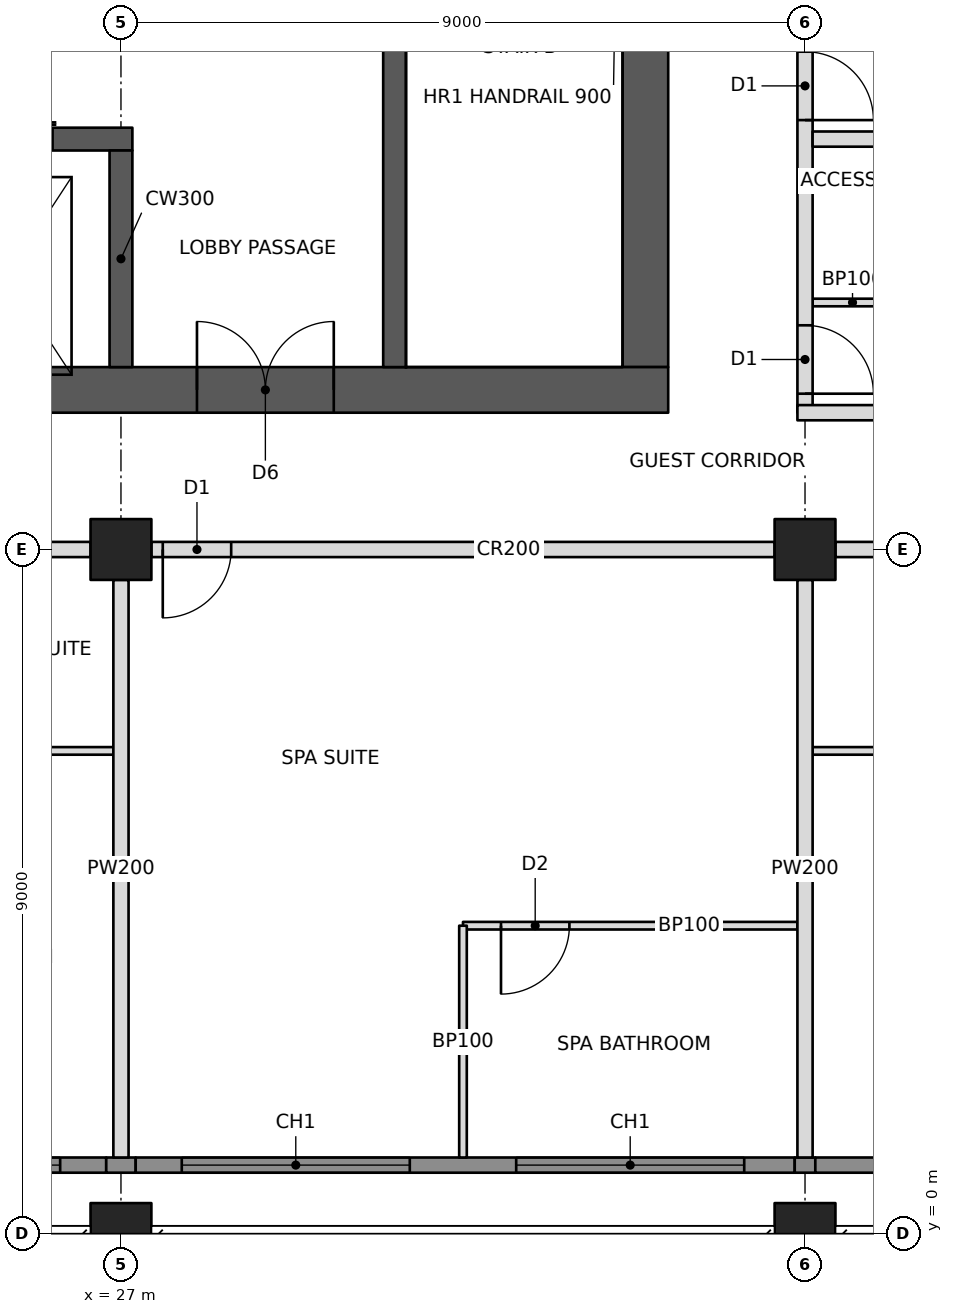
"""IFC4 building model, lengths in metres.
Left out: names, types, materials, properties, quantities, classifications, styles, units other than length and angle.
Written with IfcOpenShell. Run it as: python <this file> out.ifc"""

import sys

from ifc_helpers import new_model, si_unit, direction, frame, frame_2d, origin, origin_2d, place, context, subcontext, project, spatial, rectangle, hollow_rectangle, extrude, element, fill, save


model = new_model("IFC4")
c1 = context("Model", 3, precision=1e-05, world=origin(), true_north=direction((0.0, 1.0)))
c2 = subcontext(c1, "Body", "Model", "MODEL_VIEW")
j1 = project(units=[si_unit("LENGTHUNIT", "METRE"), si_unit("PLANEANGLEUNIT", "RADIAN")], contexts=[c1])
p1 = place(None, origin())
s1 = spatial("IfcSite", under=j1, at=p1, CompositionType="ELEMENT")
p2 = place(p1, origin())
s2 = spatial("IfcBuilding", under=s1, at=p2, CompositionType="ELEMENT")
p3 = place(p2, frame((0.0, 0.0, 201.2)))
s3 = spatial("IfcBuildingStorey", under=s2, at=p3, CompositionType="ELEMENT", Elevation=201.2)
p4 = place(p3, frame((27.0, 0.0, 0.0), z_axis=(0.0, 0.0, 1.0), x_axis=(1.0, 0.0, 0.0)))
e1 = element("IfcColumn", 1, at=p4, inside=s3, PredefinedType="COLUMN", context=c2, shape_type="SweptSolid", body=[
    extrude(hollow_rectangle(XDim=0.8, YDim=0.8, WallThickness=0.06, at=origin_2d()), origin(), (0.0, 0.0, 1.0), 3.4),
])
p5 = place(p3, frame((27.0, 9.0, 0.0), z_axis=(0.0, 0.0, 1.0), x_axis=(1.0, 0.0, 0.0)))
e2 = element("IfcColumn", 2, at=p5, inside=s3, PredefinedType="COLUMN", context=c2, shape_type="SweptSolid", body=[
    extrude(hollow_rectangle(XDim=0.8, YDim=0.8, WallThickness=0.05, at=origin_2d()), origin(), (0.0, 0.0, 1.0), 3.4),
])
p6 = place(p3, frame((36.0, 0.0, 0.0), z_axis=(0.0, 0.0, 1.0), x_axis=(1.0, 0.0, 0.0)))
e3 = element("IfcColumn", 3, at=p6, inside=s3, PredefinedType="COLUMN", context=c2, shape_type="SweptSolid", body=[
    extrude(hollow_rectangle(XDim=0.8, YDim=0.8, WallThickness=0.06, at=origin_2d()), origin(), (0.0, 0.0, 1.0), 3.4),
])
p7 = place(p3, frame((36.0, 9.0, 0.0), z_axis=(0.0, 0.0, 1.0), x_axis=(0.0, 1.0, 0.0)))
e4 = element("IfcColumn", 4, at=p7, inside=s3, PredefinedType="COLUMN", context=c2, shape_type="SweptSolid", body=[
    extrude(hollow_rectangle(XDim=0.8, YDim=0.8, WallThickness=0.05, at=origin_2d()), origin(), (0.0, 0.0, 1.0), 3.4),
])
p8 = place(p3, frame((10.8, 11.1, 0.0), z_axis=(0.0, 0.0, 1.0), x_axis=(1.0, 0.0, 0.0)))
e5 = element("IfcWall", 5, at=p8, inside=s3, PredefinedType="SHEAR", context=c2, shape_type="SweptSolid", body=[
    extrude(rectangle(XDim=23.4, YDim=0.6, at=frame_2d((11.7, 0.0))), origin(), (0.0, 0.0, 1.0), 3.4),
])
p9 = place(p8, frame((1.0, 0.0, 0.0)))
e6 = element("IfcOpeningElement", 6, at=p9, cuts=e5, PredefinedType="OPENING", context=c2, shape_type="SweptSolid", body=[
    extrude(rectangle(XDim=1.0, YDim=2.1, at=frame_2d((0.5, 1.05))), frame((0.0, 0.31, 0.0), z_axis=(0.0, -1.0, 0.0), x_axis=(1.0, 0.0, 0.0)), (0.0, 0.0, 1.0), 0.62),
])
p10 = place(p8, frame((17.2, 0.0, 0.0)))
e7 = element("IfcOpeningElement", 7, at=p10, cuts=e5, PredefinedType="OPENING", context=c2, shape_type="SweptSolid", body=[
    extrude(rectangle(XDim=1.8, YDim=2.1, at=frame_2d((0.9, 1.05))), frame((0.0, 0.31, 0.0), z_axis=(0.0, -1.0, 0.0), x_axis=(1.0, 0.0, 0.0)), (0.0, 0.0, 1.0), 0.62),
])
p11 = place(p3, frame((33.9, 11.4, 0.0), z_axis=(0.0, 0.0, 1.0), x_axis=(0.0, 1.0, 0.0)))
e8 = element("IfcWall", 8, at=p11, inside=s3, PredefinedType="SHEAR", context=c2, shape_type="SweptSolid", body=[
    extrude(rectangle(XDim=13.2, YDim=0.6, at=frame_2d((6.6, 0.0))), origin(), (0.0, 0.0, 1.0), 3.4),
])
p12 = place(p3, frame((18.15, 14.4, 0.0), z_axis=(0.0, 0.0, 1.0), x_axis=(1.0, 0.0, 0.0)))
e9 = element("IfcWall", 9, at=p12, inside=s3, PredefinedType="SHEAR", context=c2, shape_type="SweptSolid", body=[
    extrude(rectangle(XDim=9.0, YDim=0.3, at=frame_2d((4.5, 0.0))), origin(), (0.0, 0.0, 1.0), 3.4),
])
p13 = place(p12, frame((0.8, 0.0, 0.0)))
e10 = element("IfcOpeningElement", 10, at=p13, cuts=e9, PredefinedType="OPENING", context=c2, shape_type="SweptSolid", body=[
    extrude(rectangle(XDim=1.1, YDim=2.1, at=frame_2d((0.55, 1.05))), frame((0.0, 0.16, 0.0), z_axis=(0.0, -1.0, 0.0), x_axis=(1.0, 0.0, 0.0)), (0.0, 0.0, 1.0), 0.32),
])
p14 = place(p12, frame((6.75, 0.0, 0.0)))
e11 = element("IfcOpeningElement", 11, at=p14, cuts=e9, PredefinedType="OPENING", context=c2, shape_type="SweptSolid", body=[
    extrude(rectangle(XDim=1.2, YDim=2.1, at=frame_2d((0.6, 1.05))), frame((0.0, 0.16, 0.0), z_axis=(0.0, -1.0, 0.0), x_axis=(1.0, 0.0, 0.0)), (0.0, 0.0, 1.0), 0.32),
])
p15 = place(p12, frame((3.8, 0.0, 0.0)))
e12 = element("IfcOpeningElement", 12, at=p15, cuts=e9, PredefinedType="OPENING", context=c2, shape_type="SweptSolid", body=[
    extrude(rectangle(XDim=1.1, YDim=2.1, at=frame_2d((0.55, 1.05))), frame((0.0, 0.16, 0.0), z_axis=(0.0, -1.0, 0.0), x_axis=(1.0, 0.0, 0.0)), (0.0, 0.0, 1.0), 0.32),
])
p16 = place(p3, frame((27.0, 11.4, 0.0), z_axis=(0.0, 0.0, 1.0), x_axis=(0.0, 1.0, 0.0)))
e13 = element("IfcWall", 13, at=p16, inside=s3, PredefinedType="SHEAR", context=c2, shape_type="SweptSolid", body=[
    extrude(rectangle(XDim=2.85, YDim=0.3, at=frame_2d((1.425, 0.0))), origin(), (0.0, 0.0, 1.0), 3.4),
])
p17 = place(p3, frame((30.6, 11.4, 0.0), z_axis=(0.0, 0.0, 1.0), x_axis=(0.0, 1.0, 0.0)))
e14 = element("IfcWall", 14, at=p17, inside=s3, PredefinedType="SHEAR", context=c2, shape_type="SweptSolid", body=[
    extrude(rectangle(XDim=13.2, YDim=0.3, at=frame_2d((6.6, 0.0))), origin(), (0.0, 0.0, 1.0), 3.4),
])
p18 = place(p3, frame((18.4, 9.0, 0.0), z_axis=(0.0, 0.0, 1.0), x_axis=(1.0, 0.0, 0.0)))
e15 = element("IfcWall", 15, at=p18, inside=s3, PredefinedType="PARTITIONING", context=c2, shape_type="SweptSolid", body=[
    extrude(rectangle(XDim=8.2, YDim=0.2, at=frame_2d((4.1, 0.0))), origin(), (0.0, 0.0, 1.0), 2.405),
])
p19 = place(p18, frame((4.35, 0.0, 0.0)))
e16 = element("IfcOpeningElement", 16, at=p19, cuts=e15, PredefinedType="OPENING", context=c2, shape_type="SweptSolid", body=[
    extrude(rectangle(XDim=0.9, YDim=2.1, at=frame_2d((0.45, 1.05))), frame((0.0, 0.11, 0.0), z_axis=(0.0, -1.0, 0.0), x_axis=(1.0, 0.0, 0.0)), (0.0, 0.0, 1.0), 0.22),
])
p20 = place(p3, frame((27.4, 9.0, 0.0), z_axis=(0.0, 0.0, 1.0), x_axis=(1.0, 0.0, 0.0)))
e17 = element("IfcWall", 17, at=p20, inside=s3, PredefinedType="PARTITIONING", context=c2, shape_type="SweptSolid", body=[
    extrude(rectangle(XDim=8.2, YDim=0.2, at=frame_2d((4.1, 0.0))), origin(), (0.0, 0.0, 1.0), 2.405),
])
p21 = place(p20, frame((0.15, 0.0, 0.0)))
e18 = element("IfcOpeningElement", 18, at=p21, cuts=e17, PredefinedType="OPENING", context=c2, shape_type="SweptSolid", body=[
    extrude(rectangle(XDim=0.9, YDim=2.1, at=frame_2d((0.45, 1.05))), frame((0.0, 0.11, 0.0), z_axis=(0.0, -1.0, 0.0), x_axis=(1.0, 0.0, 0.0)), (0.0, 0.0, 1.0), 0.22),
])
p22 = place(p3, frame((36.4, 9.0, 0.0), z_axis=(0.0, 0.0, 1.0), x_axis=(1.0, 0.0, 0.0)))
e19 = element("IfcWall", 19, at=p22, inside=s3, PredefinedType="PARTITIONING", context=c2, shape_type="SweptSolid", body=[
    extrude(rectangle(XDim=7.6, YDim=0.2, at=frame_2d((3.8, 0.0))), origin(), (0.0, 0.0, 1.0), 2.438),
])
p23 = place(p22, frame((6.45, 0.0, 0.0)))
e20 = element("IfcOpeningElement", 20, at=p23, cuts=e19, PredefinedType="OPENING", context=c2, shape_type="SweptSolid", body=[
    extrude(rectangle(XDim=0.9, YDim=2.1, at=frame_2d((0.45, 1.05))), frame((0.0, 0.11, 0.0), z_axis=(0.0, -1.0, 0.0), x_axis=(1.0, 0.0, 0.0)), (0.0, 0.0, 1.0), 0.22),
])
p24 = place(p3, frame((36.0, 10.8, 0.0), z_axis=(0.0, 0.0, 1.0), x_axis=(0.0, 1.0, 0.0)))
e21 = element("IfcWall", 21, at=p24, inside=s3, PredefinedType="PARTITIONING", context=c2, shape_type="SweptSolid", body=[
    extrude(rectangle(XDim=6.8, YDim=0.2, at=frame_2d((3.4, 0.0))), origin(), (0.0, 0.0, 1.0), 2.405),
])
p25 = place(p24, frame((0.25, 0.0, 0.0)))
e22 = element("IfcOpeningElement", 22, at=p25, cuts=e21, PredefinedType="OPENING", context=c2, shape_type="SweptSolid", body=[
    extrude(rectangle(XDim=0.9, YDim=2.1, at=frame_2d((0.45, 1.05))), frame((0.0, 0.11, 0.0), z_axis=(0.0, -1.0, 0.0), x_axis=(1.0, 0.0, 0.0)), (0.0, 0.0, 1.0), 0.22),
])
p26 = place(p24, frame((3.85, 0.0, 0.0)))
e23 = element("IfcOpeningElement", 23, at=p26, cuts=e21, PredefinedType="OPENING", context=c2, shape_type="SweptSolid", body=[
    extrude(rectangle(XDim=0.9, YDim=2.1, at=frame_2d((0.45, 1.05))), frame((0.0, 0.11, 0.0), z_axis=(0.0, -1.0, 0.0), x_axis=(1.0, 0.0, 0.0)), (0.0, 0.0, 1.0), 0.22),
])
p27 = place(p3, frame((35.9, 10.8, 0.0), z_axis=(0.0, 0.0, 1.0), x_axis=(1.0, 0.0, 0.0)))
e24 = element("IfcWall", 24, at=p27, inside=s3, PredefinedType="PARTITIONING", context=c2, shape_type="SweptSolid", body=[
    extrude(rectangle(XDim=8.1, YDim=0.2, at=frame_2d((4.05, 0.0))), origin(), (0.0, 0.0, 1.0), 2.404),
])
p28 = place(p3, frame((27.0, 8.6, 0.0), z_axis=(0.0, 0.0, 1.0), x_axis=(0.0, -1.0, 0.0)))
e25 = element("IfcWall", 25, at=p28, inside=s3, PredefinedType="PARTITIONING", context=c2, shape_type="SweptSolid", body=[
    extrude(rectangle(XDim=7.6, YDim=0.2, at=frame_2d((3.8, 0.0))), origin(), (0.0, 0.0, 1.0), 2.405),
])
p29 = place(p3, frame((36.0, 8.6, 0.0), z_axis=(0.0, 0.0, 1.0), x_axis=(0.0, -1.0, 0.0)))
e26 = element("IfcWall", 26, at=p29, inside=s3, PredefinedType="PARTITIONING", context=c2, shape_type="SweptSolid", body=[
    extrude(rectangle(XDim=7.6, YDim=0.2, at=frame_2d((3.8, 0.0))), origin(), (0.0, 0.0, 1.0), 2.438),
])
p30 = place(p3, frame((23.95, 6.35, 0.0), z_axis=(0.0, 0.0, 1.0), x_axis=(1.0, 0.0, 0.0)))
e27 = element("IfcWall", 27, at=p30, inside=s3, PredefinedType="PARTITIONING", context=c2, shape_type="SweptSolid", body=[
    extrude(rectangle(XDim=2.95, YDim=0.1, at=frame_2d((1.475, 0.0))), origin(), (0.0, 0.0, 1.0), 2.404),
])
p31 = place(p3, frame((31.5, 4.05, 0.0), z_axis=(0.0, 0.0, 1.0), x_axis=(1.0, 0.0, 0.0)))
e28 = element("IfcWall", 28, at=p31, inside=s3, PredefinedType="PARTITIONING", context=c2, shape_type="SweptSolid", body=[
    extrude(rectangle(XDim=4.4, YDim=0.1, at=frame_2d((2.2, 0.0))), origin(), (0.0, 0.0, 1.0), 2.438),
])
p32 = place(p31, frame((0.5, 0.0, 0.0)))
e29 = element("IfcOpeningElement", 29, at=p32, cuts=e28, PredefinedType="OPENING", context=c2, shape_type="SweptSolid", body=[
    extrude(rectangle(XDim=0.9, YDim=2.1, at=frame_2d((0.45, 1.05))), frame((0.0, 0.06, 0.0), z_axis=(0.0, -1.0, 0.0), x_axis=(1.0, 0.0, 0.0)), (0.0, 0.0, 1.0), 0.12),
])
p33 = place(p3, frame((31.5, 4.05, 0.0), z_axis=(0.0, 0.0, 1.0), x_axis=(0.0, -1.0, 0.0)))
e30 = element("IfcWall", 30, at=p33, inside=s3, PredefinedType="PARTITIONING", context=c2, shape_type="SweptSolid", body=[
    extrude(rectangle(XDim=3.05, YDim=0.1, at=frame_2d((1.525, 0.0))), origin(), (0.0, 0.0, 1.0), 3.2),
])
p34 = place(p3, frame((36.1, 6.35, 0.0), z_axis=(0.0, 0.0, 1.0), x_axis=(1.0, 0.0, 0.0)))
e31 = element("IfcWall", 31, at=p34, inside=s3, PredefinedType="PARTITIONING", context=c2, shape_type="SweptSolid", body=[
    extrude(rectangle(XDim=3.45, YDim=0.1, at=frame_2d((1.725, 0.0))), origin(), (0.0, 0.0, 1.0), 2.438),
])
p35 = place(p3, frame((36.1, 14.4, 0.0), z_axis=(0.0, 0.0, 1.0), x_axis=(1.0, 0.0, 0.0)))
e32 = element("IfcWall", 32, at=p35, inside=s3, PredefinedType="PARTITIONING", context=c2, shape_type="SweptSolid", body=[
    extrude(rectangle(XDim=7.9, YDim=0.2, at=frame_2d((3.95, 0.0))), origin(), (0.0, 0.0, 1.0), 2.404),
])
p36 = place(p3, frame((36.1, 12.25, 0.0), z_axis=(0.0, 0.0, 1.0), x_axis=(1.0, 0.0, 0.0)))
e33 = element("IfcWall", 33, at=p36, inside=s3, PredefinedType="PARTITIONING", context=c2, shape_type="SweptSolid", body=[
    extrude(rectangle(XDim=2.5, YDim=0.1, at=frame_2d((1.25, 0.0))), origin(), (0.0, 0.0, 1.0), 2.404),
])
p37 = place(p36, frame((1.2, 0.0, 0.0)))
e34 = element("IfcOpeningElement", 34, at=p37, cuts=e33, PredefinedType="OPENING", context=c2, shape_type="SweptSolid", body=[
    extrude(rectangle(XDim=0.9, YDim=2.1, at=frame_2d((0.45, 1.05))), frame((0.0, 0.06, 0.0), z_axis=(0.0, -1.0, 0.0), x_axis=(1.0, 0.0, 0.0)), (0.0, 0.0, 1.0), 0.12),
])
p38 = place(p3, frame((18.194, 0.9, 0.0), z_axis=(0.0, 0.0, 1.0), x_axis=(1.0, 0.0, 0.0)))
e35 = element("IfcWall", 35, at=p38, inside=s3, PredefinedType="SOLIDWALL", context=c2, shape_type="SweptSolid", body=[
    extrude(rectangle(XDim=8.612, YDim=0.2, at=frame_2d((4.306, 0.0))), origin(), (0.0, 0.0, 1.0), 3.2),
])
p39 = place(p38, frame((0.606, 0.0, 0.6)))
e36 = element("IfcOpeningElement", 36, at=p39, cuts=e35, PredefinedType="OPENING", context=c2, shape_type="SweptSolid", body=[
    extrude(rectangle(XDim=3.0, YDim=2.2, at=frame_2d((1.5, 1.1))), frame((0.0, 0.11, 0.0), z_axis=(0.0, -1.0, 0.0), x_axis=(1.0, 0.0, 0.0)), (0.0, 0.0, 1.0), 0.22),
])
p40 = place(p38, frame((5.006, 0.0, 0.6)))
e37 = element("IfcOpeningElement", 37, at=p40, cuts=e35, PredefinedType="OPENING", context=c2, shape_type="SweptSolid", body=[
    extrude(rectangle(XDim=3.0, YDim=2.2, at=frame_2d((1.5, 1.1))), frame((0.0, 0.11, 0.0), z_axis=(0.0, -1.0, 0.0), x_axis=(1.0, 0.0, 0.0)), (0.0, 0.0, 1.0), 0.22),
])
p41 = place(p3, frame((26.806, 0.9, 0.0), z_axis=(0.0, 0.0, 1.0), x_axis=(1.0, 0.0, 0.0)))
e38 = element("IfcWall", 38, at=p41, inside=s3, PredefinedType="SOLIDWALL", context=c2, shape_type="SweptSolid", body=[
    extrude(rectangle(XDim=0.388, YDim=0.2, at=frame_2d((0.194, 0.0))), origin(), (0.0, 0.0, 1.0), 2.404),
])
p42 = place(p3, frame((27.194, 0.9, 0.0), z_axis=(0.0, 0.0, 1.0), x_axis=(1.0, 0.0, 0.0)))
e39 = element("IfcWall", 39, at=p42, inside=s3, PredefinedType="SOLIDWALL", context=c2, shape_type="SweptSolid", body=[
    extrude(rectangle(XDim=8.671, YDim=0.2, at=frame_2d((4.335, 0.0))), origin(), (0.0, 0.0, 1.0), 3.2),
])
p43 = place(p42, frame((0.606, 0.0, 0.6)))
e40 = element("IfcOpeningElement", 40, at=p43, cuts=e39, PredefinedType="OPENING", context=c2, shape_type="SweptSolid", body=[
    extrude(rectangle(XDim=3.0, YDim=2.2, at=frame_2d((1.5, 1.1))), frame((0.0, 0.11, 0.0), z_axis=(0.0, -1.0, 0.0), x_axis=(1.0, 0.0, 0.0)), (0.0, 0.0, 1.0), 0.22),
])
p44 = place(p42, frame((5.006, 0.0, 0.6)))
e41 = element("IfcOpeningElement", 41, at=p44, cuts=e39, PredefinedType="OPENING", context=c2, shape_type="SweptSolid", body=[
    extrude(rectangle(XDim=3.0, YDim=2.2, at=frame_2d((1.5, 1.1))), frame((0.0, 0.11, 0.0), z_axis=(0.0, -1.0, 0.0), x_axis=(1.0, 0.0, 0.0)), (0.0, 0.0, 1.0), 0.22),
])
p45 = place(p3, frame((35.865, 0.9, 0.0), z_axis=(0.0, 0.0, 1.0), x_axis=(1.0, 0.0, 0.0)))
e42 = element("IfcWall", 42, at=p45, inside=s3, PredefinedType="SOLIDWALL", context=c2, shape_type="SweptSolid", body=[
    extrude(rectangle(XDim=0.271, YDim=0.2, at=frame_2d((0.135, 0.0))), origin(), (0.0, 0.0, 1.0), 2.438),
])
p46 = place(p3, frame((36.135, 0.9, 0.0), z_axis=(0.0, 0.0, 1.0), x_axis=(1.0, 0.0, 0.0)))
e43 = element("IfcWall", 43, at=p46, inside=s3, PredefinedType="SOLIDWALL", context=c2, shape_type="SweptSolid", body=[
    extrude(rectangle(XDim=5.865, YDim=0.2, at=frame_2d((2.932, 0.0))), origin(), (0.0, 0.0, 1.0), 3.2),
])
p47 = place(p46, frame((1.415, 0.0, 0.6)))
e44 = element("IfcOpeningElement", 44, at=p47, cuts=e43, PredefinedType="OPENING", context=c2, shape_type="SweptSolid", body=[
    extrude(rectangle(XDim=3.0, YDim=2.2, at=frame_2d((1.5, 1.1))), frame((0.0, 0.11, 0.0), z_axis=(0.0, -1.0, 0.0), x_axis=(1.0, 0.0, 0.0)), (0.0, 0.0, 1.0), 0.22),
])
p48 = place(p40, origin())
e45 = element("IfcWindow", 45, at=p48, inside=s3, PartitioningType="TRIPLE_PANEL_VERTICAL", PredefinedType="WINDOW", context=c2, shape_type="SweptSolid", body=[
    extrude(rectangle(XDim=3.0, YDim=2.2, at=frame_2d((1.5, 1.1))), frame((0.0, 0.03, 0.0), z_axis=(0.0, -1.0, 0.0), x_axis=(1.0, 0.0, 0.0)), (0.0, 0.0, 1.0), 0.06),
])
fill(e37, e45)
p49 = place(p43, origin())
e46 = element("IfcWindow", 46, at=p49, inside=s3, PartitioningType="TRIPLE_PANEL_VERTICAL", PredefinedType="WINDOW", context=c2, shape_type="SweptSolid", body=[
    extrude(rectangle(XDim=3.0, YDim=2.2, at=frame_2d((1.5, 1.1))), frame((0.0, 0.03, 0.0), z_axis=(0.0, -1.0, 0.0), x_axis=(1.0, 0.0, 0.0)), (0.0, 0.0, 1.0), 0.06),
])
fill(e40, e46)
p50 = place(p44, origin())
e47 = element("IfcWindow", 47, at=p50, inside=s3, PartitioningType="TRIPLE_PANEL_VERTICAL", PredefinedType="WINDOW", context=c2, shape_type="SweptSolid", body=[
    extrude(rectangle(XDim=3.0, YDim=2.2, at=frame_2d((1.5, 1.1))), frame((0.0, 0.03, 0.0), z_axis=(0.0, -1.0, 0.0), x_axis=(1.0, 0.0, 0.0)), (0.0, 0.0, 1.0), 0.06),
])
fill(e41, e47)
p51 = place(p32, frame((0.9, 0.0, 0.0), z_axis=(0.0, 0.0, 1.0), x_axis=(-1.0, 0.0, 0.0)))
e48 = element("IfcDoor", 48, at=p51, inside=s3, OperationType="SINGLE_SWING_RIGHT", PredefinedType="DOOR", context=c2, shape_type="SweptSolid", body=[
    extrude(rectangle(XDim=0.9, YDim=2.1, at=frame_2d((0.45, 1.05))), frame((0.0, 0.025, 0.0), z_axis=(0.0, -1.0, 0.0), x_axis=(1.0, 0.0, 0.0)), (0.0, 0.0, 1.0), 0.05),
])
fill(e29, e48)
p52 = place(p21, frame((0.9, 0.0, 0.0), z_axis=(0.0, 0.0, 1.0), x_axis=(-1.0, 0.0, 0.0)))
e49 = element("IfcDoor", 49, at=p52, inside=s3, OperationType="SINGLE_SWING_RIGHT", PredefinedType="DOOR", context=c2, shape_type="SweptSolid", body=[
    extrude(rectangle(XDim=0.9, YDim=2.1, at=frame_2d((0.45, 1.05))), frame((0.0, 0.025, 0.0), z_axis=(0.0, -1.0, 0.0), x_axis=(1.0, 0.0, 0.0)), (0.0, 0.0, 1.0), 0.05),
])
fill(e18, e49)
p53 = place(p25, frame((0.9, 0.0, 0.0), z_axis=(0.0, 0.0, 1.0), x_axis=(-1.0, 0.0, 0.0)))
e50 = element("IfcDoor", 50, at=p53, inside=s3, OperationType="SINGLE_SWING_RIGHT", PredefinedType="DOOR", context=c2, shape_type="SweptSolid", body=[
    extrude(rectangle(XDim=0.9, YDim=2.1, at=frame_2d((0.45, 1.05))), frame((0.0, 0.025, 0.0), z_axis=(0.0, -1.0, 0.0), x_axis=(1.0, 0.0, 0.0)), (0.0, 0.0, 1.0), 0.05),
])
fill(e22, e50)
p54 = place(p26, frame((0.9, 0.0, 0.0), z_axis=(0.0, 0.0, 1.0), x_axis=(-1.0, 0.0, 0.0)))
e51 = element("IfcDoor", 51, at=p54, inside=s3, OperationType="SINGLE_SWING_RIGHT", PredefinedType="DOOR", context=c2, shape_type="SweptSolid", body=[
    extrude(rectangle(XDim=0.9, YDim=2.1, at=frame_2d((0.45, 1.05))), frame((0.0, 0.025, 0.0), z_axis=(0.0, -1.0, 0.0), x_axis=(1.0, 0.0, 0.0)), (0.0, 0.0, 1.0), 0.05),
])
fill(e23, e51)
p55 = place(p10, origin())
e52 = element("IfcDoor", 52, at=p55, inside=s3, OperationType="DOUBLE_DOOR_SINGLE_SWING", PredefinedType="DOOR", context=c2, shape_type="SweptSolid", body=[
    extrude(rectangle(XDim=1.8, YDim=2.1, at=frame_2d((0.9, 1.05))), frame((0.0, 0.025, 0.0), z_axis=(0.0, -1.0, 0.0), x_axis=(1.0, 0.0, 0.0)), (0.0, 0.0, 1.0), 0.05),
])
fill(e7, e52)
save(model, sys.argv[1])
